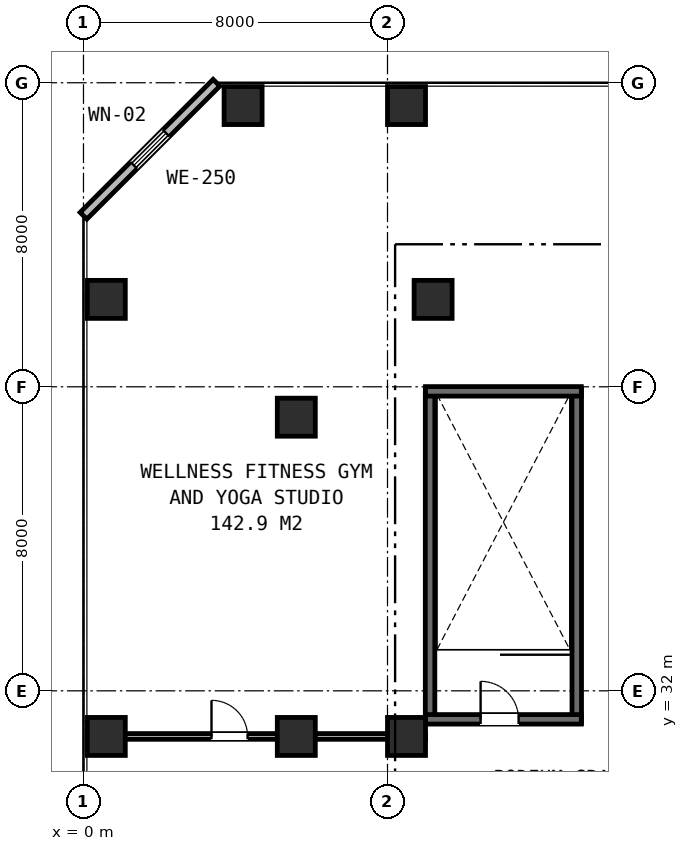
"""IFC4 building model, lengths in metres.
Left out: names, types, materials, properties, quantities, classifications, styles, units other than length and angle.
Written with IfcOpenShell. Run it as: python <this file> out.ifc"""

import sys

from ifc_helpers import new_model, si_unit, direction, frame, frame_2d, origin, origin_2d, place, context, subcontext, project, spatial, rectangle, extrude, element, fill, save


model = new_model("IFC4")
c1 = context("Model", 3, precision=1e-05, world=origin(), true_north=direction((0.0, 1.0)))
c2 = subcontext(c1, "Body", "Model", "MODEL_VIEW")
j1 = project(units=[si_unit("LENGTHUNIT", "METRE"), si_unit("PLANEANGLEUNIT", "RADIAN")], contexts=[c1])
p1 = place(None, origin())
s1 = spatial("IfcSite", under=j1, at=p1, CompositionType="ELEMENT")
p2 = place(p1, origin())
s2 = spatial("IfcBuilding", under=s1, at=p2, CompositionType="ELEMENT")
p3 = place(p2, frame((0.0, 0.0, 21.3)))
s3 = spatial("IfcBuildingStorey", under=s2, at=p3, CompositionType="ELEMENT", Elevation=21.3)
for number, where, z_axis, x_axis in (
    (1, (9.12, 31.15, 0.0), (0.0, 0.0, 1.0), (0.0, 1.0, 0.0)),
    (2, (12.98, 31.15, 0.0), (0.0, 0.0, 1.0), (0.0, 1.0, 0.0)),
):
    element("IfcWall", number, at=place(p3, frame(where, z_axis=z_axis, x_axis=x_axis)), inside=s3, PredefinedType="SHEAR", context=c2, shape_type="SweptSolid", body=[
        extrude(rectangle(XDim=8.8, YDim=0.25, at=frame_2d((4.4, 0.0))), origin(), (0.0, 0.0, 1.0), 4.5),
    ])
p4 = place(p3, frame((9.0, 39.88, 0.0), z_axis=(0.0, 0.0, 1.0), x_axis=(1.0, 0.0, 0.0)))
e3 = element("IfcWall", 3, at=p4, inside=s3, PredefinedType="SHEAR", context=c2, shape_type="SweptSolid", body=[
    extrude(rectangle(XDim=4.1, YDim=0.25, at=frame_2d((2.05, 0.0))), origin(), (0.0, 0.0, 1.0), 4.5),
])
p5 = place(p3, frame((9.0, 31.25, 0.0), z_axis=(0.0, 0.0, 1.0), x_axis=(1.0, 0.0, 0.0)))
e4 = element("IfcWall", 4, at=p5, inside=s3, PredefinedType="SHEAR", context=c2, shape_type="SweptSolid", body=[
    extrude(rectangle(XDim=4.1, YDim=0.25, at=frame_2d((2.05, 0.0))), origin(), (0.0, 0.0, 1.0), 4.5),
])
p6 = place(p5, frame((1.45, 0.0, 0.0)))
e5 = element("IfcOpeningElement", 5, at=p6, cuts=e4, PredefinedType="OPENING", context=c2, shape_type="SweptSolid", body=[
    extrude(rectangle(XDim=1.0, YDim=2.15, at=frame_2d((0.5, 1.075))), frame((0.0, 0.135, 0.0), z_axis=(0.0, -1.0, 0.0), x_axis=(1.0, 0.0, 0.0)), (0.0, 0.0, 1.0), 0.27),
])
for number, where, z_axis, x_axis in (
    (6, (5.6, 30.8, 0.0), (0.0, 0.0, 1.0), (1.0, 0.0, 0.0)),
    (7, (5.6, 39.2, 0.0), (0.0, 0.0, 1.0), (1.0, 0.0, 0.0)),
    (8, (8.5, 30.8, 0.0), (0.0, 0.0, 1.0), (1.0, 0.0, 0.0)),
    (9, (9.2, 42.3, 0.0), (0.0, 0.0, 1.0), (1.0, 0.0, 0.0)),
    (10, (0.6, 30.8, 0.0), (0.0, 0.0, 1.0), (1.0, 0.0, 0.0)),
    (11, (0.6, 42.3, 0.0), (0.0, 0.0, 1.0), (1.0, 0.0, 0.0)),
    (12, (4.2, 47.4, 0.0), (0.0, 0.0, 1.0), (1.0, 0.0, 0.0)),
    (13, (8.5, 47.4, 0.0), (0.0, 0.0, 1.0), (1.0, 0.0, 0.0)),
):
    element("IfcColumn", number, at=place(p3, frame(where, z_axis=z_axis, x_axis=x_axis)), inside=s3, PredefinedType="COLUMN", context=c2, shape_type="SweptSolid", body=[
        extrude(rectangle(XDim=1.0, YDim=1.0, at=origin_2d()), origin(), (0.0, 0.0, 1.0), 4.5),
    ])
p7 = place(p3, frame((3.5, 48.0, 0.0), z_axis=(0.0, 0.0, 1.0), x_axis=(-0.707106781187, -0.707106781187, 0.0)))
e14 = element("IfcWall", 14, at=p7, inside=s3, PredefinedType="STANDARD", context=c2, shape_type="SweptSolid", body=[
    extrude(rectangle(XDim=4.95, YDim=0.25, at=frame_2d((2.475, 0.0))), origin(), (0.0, 0.0, 1.0), 4.23),
])
p8 = place(p7, frame((1.875, 0.0, 0.85)))
e15 = element("IfcOpeningElement", 15, at=p8, cuts=e14, PredefinedType="OPENING", context=c2, shape_type="SweptSolid", body=[
    extrude(rectangle(XDim=1.2, YDim=1.6, at=frame_2d((0.6, 0.8))), frame((0.0, 0.135, 0.0), z_axis=(0.0, -1.0, 0.0), x_axis=(1.0, 0.0, 0.0)), (0.0, 0.0, 1.0), 0.27),
])
p9 = place(p3, frame((0.1, 30.8, 0.0), z_axis=(0.0, 0.0, 1.0), x_axis=(1.0, 0.0, 0.0)))
e16 = element("IfcWall", 16, at=p9, inside=s3, PredefinedType="PARTITIONING", context=c2, shape_type="SweptSolid", body=[
    extrude(rectangle(XDim=8.9, YDim=0.15, at=frame_2d((4.45, 0.0))), origin(), (0.0, 0.0, 1.0), 3.58),
])
p10 = place(p9, frame((3.268, 0.0, 0.0)))
e17 = element("IfcOpeningElement", 17, at=p10, cuts=e16, PredefinedType="OPENING", context=c2, shape_type="SweptSolid", body=[
    extrude(rectangle(XDim=0.95, YDim=2.15, at=frame_2d((0.475, 1.075))), frame((0.0, 0.085, 0.0), z_axis=(0.0, -1.0, 0.0), x_axis=(1.0, 0.0, 0.0)), (0.0, 0.0, 1.0), 0.17),
])
p11 = place(p8, origin())
e18 = element("IfcWindow", 18, at=p11, inside=s3, PartitioningType="SINGLE_PANEL", PredefinedType="WINDOW", context=c2, shape_type="SweptSolid", body=[
    extrude(rectangle(XDim=1.2, YDim=1.6, at=frame_2d((0.6, 0.8))), frame((0.0, 0.03, 0.0), z_axis=(0.0, -1.0, 0.0), x_axis=(1.0, 0.0, 0.0)), (0.0, 0.0, 1.0), 0.06),
])
fill(e15, e18)
p12 = place(p6, origin())
e19 = element("IfcDoor", 19, at=p12, inside=s3, OperationType="SINGLE_SWING_LEFT", PredefinedType="DOOR", context=c2, shape_type="SweptSolid", body=[
    extrude(rectangle(XDim=1.0, YDim=2.15, at=frame_2d((0.5, 1.075))), frame((0.0, 0.025, 0.0), z_axis=(0.0, -1.0, 0.0), x_axis=(1.0, 0.0, 0.0)), (0.0, 0.0, 1.0), 0.05),
])
fill(e5, e19)
p13 = place(p10, origin())
e20 = element("IfcDoor", 20, at=p13, inside=s3, OperationType="SINGLE_SWING_LEFT", PredefinedType="DOOR", context=c2, shape_type="SweptSolid", body=[
    extrude(rectangle(XDim=0.95, YDim=2.15, at=frame_2d((0.475, 1.075))), frame((0.0, 0.025, 0.0), z_axis=(0.0, -1.0, 0.0), x_axis=(1.0, 0.0, 0.0)), (0.0, 0.0, 1.0), 0.05),
])
fill(e17, e20)
save(model, sys.argv[1])
